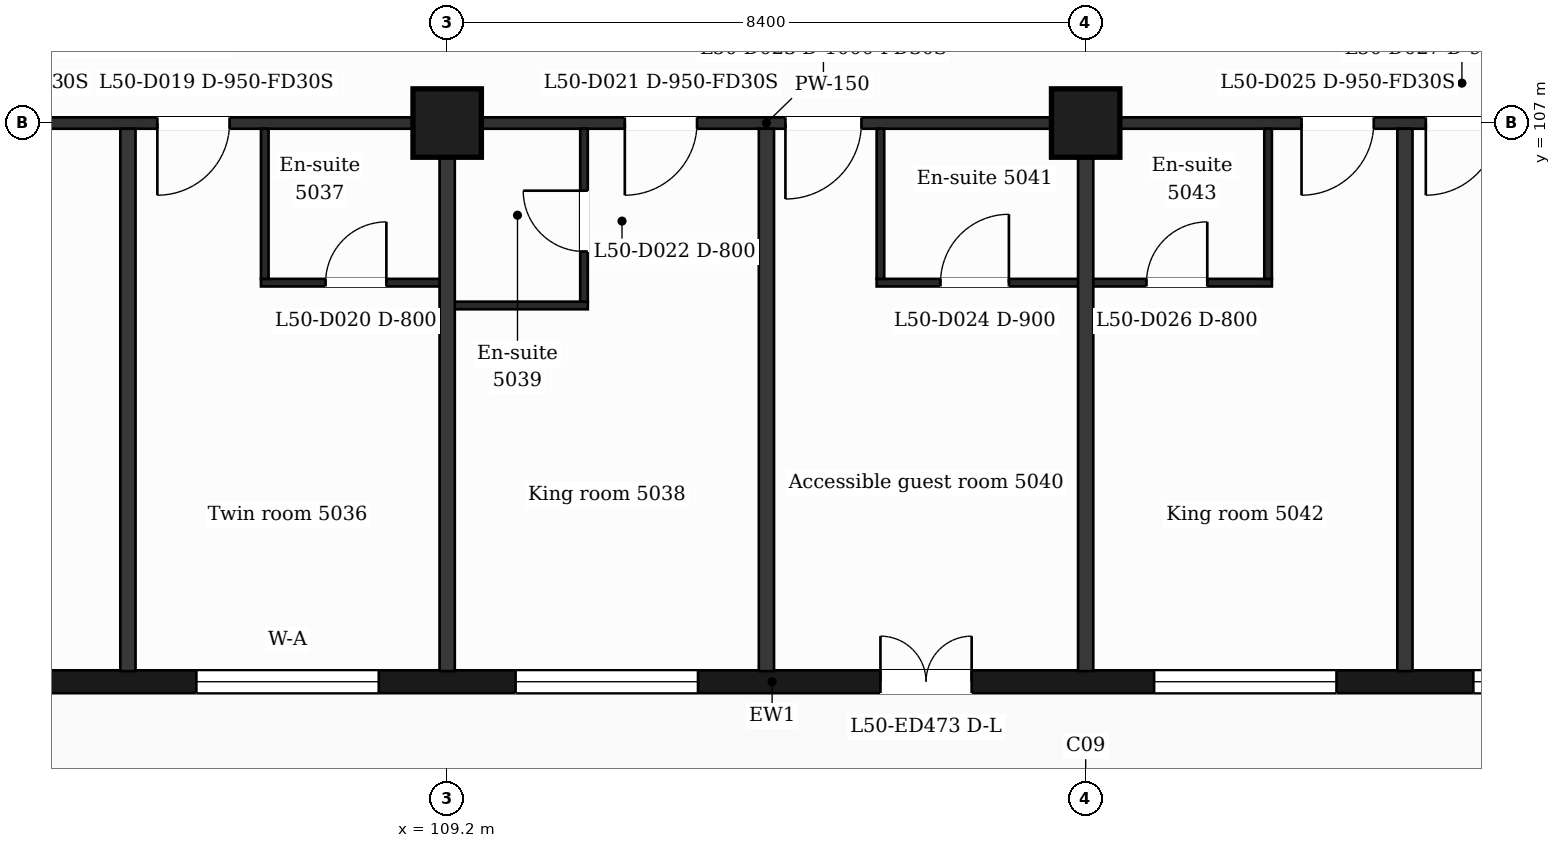
"""IFC4 building model, lengths in metres.
Left out: names, types, materials, properties, quantities, classifications, styles, units other than length and angle.
Written with IfcOpenShell. Run it as: python <this file> out.ifc"""

import sys

from ifc_helpers import new_model, si_unit, direction, frame, frame_2d, origin, origin_2d, place, context, subcontext, project, spatial, rectangle, extrude, element, fill, save


model = new_model("IFC4")
c1 = context("Model", 3, precision=1e-05, world=origin(), true_north=direction((0.0, 1.0)))
c2 = subcontext(c1, "Body", "Model", "MODEL_VIEW")
j1 = project(units=[si_unit("LENGTHUNIT", "METRE"), si_unit("PLANEANGLEUNIT", "RADIAN")], contexts=[c1])
p1 = place(None, origin())
s1 = spatial("IfcSite", under=j1, at=p1, CompositionType="ELEMENT")
p2 = place(p1, origin())
s2 = spatial("IfcBuilding", under=s1, at=p2, CompositionType="ELEMENT")
p3 = place(p2, frame((0.0, 0.0, 209.6)))
s3 = spatial("IfcBuildingStorey", under=s2, at=p3, CompositionType="ELEMENT", Elevation=209.6)
for number, where, z_axis, x_axis in (
    (1, (109.2, 107.0, 0.0), (0.0, 0.0, 1.0), (1.0, 0.0, 0.0)),
    (2, (117.6, 107.0, 0.0), (0.0, 0.0, 1.0), (1.0, 0.0, 0.0)),
):
    element("IfcColumn", number, at=place(p3, frame(where, z_axis=z_axis, x_axis=x_axis)), inside=s3, PredefinedType="COLUMN", context=c2, shape_type="SweptSolid", body=[
        extrude(rectangle(XDim=0.9, YDim=0.9, at=origin_2d()), origin(), (0.0, 0.0, 1.0), 3.7),
    ])
p4 = place(p3, frame((89.85, 99.65, 0.0), z_axis=(0.0, 0.0, 1.0), x_axis=(1.0, 0.0, 0.0)))
e3 = element("IfcWall", 3, at=p4, inside=s3, PredefinedType="SOLIDWALL", context=c2, shape_type="SweptSolid", body=[
    extrude(rectangle(XDim=47.25, YDim=0.3, at=frame_2d((23.625, 0.0))), origin(), (0.0, 0.0, 1.0), 3.38),
])
p5 = place(p4, frame((0.725, 0.0, 0.9)))
e4 = element("IfcOpeningElement", 4, at=p5, cuts=e3, PredefinedType="OPENING", context=c2, shape_type="SweptSolid", body=[
    extrude(rectangle(XDim=1.2, YDim=2.1, at=frame_2d((0.6, 1.05))), frame((0.0, 0.16, 0.0), z_axis=(0.0, -1.0, 0.0), x_axis=(1.0, 0.0, 0.0)), (0.0, 0.0, 1.0), 0.32),
])
p6 = place(p4, frame((3.45, 0.0, 0.9)))
e5 = element("IfcOpeningElement", 5, at=p6, cuts=e3, PredefinedType="OPENING", context=c2, shape_type="SweptSolid", body=[
    extrude(rectangle(XDim=2.4, YDim=2.1, at=frame_2d((1.2, 1.05))), frame((0.0, 0.16, 0.0), z_axis=(0.0, -1.0, 0.0), x_axis=(1.0, 0.0, 0.0)), (0.0, 0.0, 1.0), 0.32),
])
p7 = place(p4, frame((8.25, 0.0, 0.9)))
e6 = element("IfcOpeningElement", 6, at=p7, cuts=e3, PredefinedType="OPENING", context=c2, shape_type="SweptSolid", body=[
    extrude(rectangle(XDim=1.2, YDim=2.1, at=frame_2d((0.6, 1.05))), frame((0.0, 0.16, 0.0), z_axis=(0.0, -1.0, 0.0), x_axis=(1.0, 0.0, 0.0)), (0.0, 0.0, 1.0), 0.32),
])
p8 = place(p4, frame((12.45, 0.0, 0.9)))
e7 = element("IfcOpeningElement", 7, at=p8, cuts=e3, PredefinedType="OPENING", context=c2, shape_type="SweptSolid", body=[
    extrude(rectangle(XDim=1.2, YDim=2.1, at=frame_2d((0.6, 1.05))), frame((0.0, 0.16, 0.0), z_axis=(0.0, -1.0, 0.0), x_axis=(1.0, 0.0, 0.0)), (0.0, 0.0, 1.0), 0.32),
])
p9 = place(p4, frame((16.05, 0.0, 0.9)))
e8 = element("IfcOpeningElement", 8, at=p9, cuts=e3, PredefinedType="OPENING", context=c2, shape_type="SweptSolid", body=[
    extrude(rectangle(XDim=2.4, YDim=2.1, at=frame_2d((1.2, 1.05))), frame((0.0, 0.16, 0.0), z_axis=(0.0, -1.0, 0.0), x_axis=(1.0, 0.0, 0.0)), (0.0, 0.0, 1.0), 0.32),
])
p10 = place(p4, frame((20.25, 0.0, 0.9)))
e9 = element("IfcOpeningElement", 9, at=p10, cuts=e3, PredefinedType="OPENING", context=c2, shape_type="SweptSolid", body=[
    extrude(rectangle(XDim=2.4, YDim=2.1, at=frame_2d((1.2, 1.05))), frame((0.0, 0.16, 0.0), z_axis=(0.0, -1.0, 0.0), x_axis=(1.0, 0.0, 0.0)), (0.0, 0.0, 1.0), 0.32),
])
p11 = place(p4, frame((25.05, 0.0, 0.0)))
e10 = element("IfcOpeningElement", 10, at=p11, cuts=e3, PredefinedType="OPENING", context=c2, shape_type="SweptSolid", body=[
    extrude(rectangle(XDim=1.2, YDim=2.4, at=frame_2d((0.6, 1.2))), frame((0.0, 0.16, 0.0), z_axis=(0.0, -1.0, 0.0), x_axis=(1.0, 0.0, 0.0)), (0.0, 0.0, 1.0), 0.32),
])
p12 = place(p4, frame((28.65, 0.0, 0.9)))
e11 = element("IfcOpeningElement", 11, at=p12, cuts=e3, PredefinedType="OPENING", context=c2, shape_type="SweptSolid", body=[
    extrude(rectangle(XDim=2.4, YDim=2.1, at=frame_2d((1.2, 1.05))), frame((0.0, 0.16, 0.0), z_axis=(0.0, -1.0, 0.0), x_axis=(1.0, 0.0, 0.0)), (0.0, 0.0, 1.0), 0.32),
])
p13 = place(p4, frame((32.85, 0.0, 0.9)))
e12 = element("IfcOpeningElement", 12, at=p13, cuts=e3, PredefinedType="OPENING", context=c2, shape_type="SweptSolid", body=[
    extrude(rectangle(XDim=2.4, YDim=2.1, at=frame_2d((1.2, 1.05))), frame((0.0, 0.16, 0.0), z_axis=(0.0, -1.0, 0.0), x_axis=(1.0, 0.0, 0.0)), (0.0, 0.0, 1.0), 0.32),
])
p14 = place(p4, frame((37.65, 0.0, 0.9)))
e13 = element("IfcOpeningElement", 13, at=p14, cuts=e3, PredefinedType="OPENING", context=c2, shape_type="SweptSolid", body=[
    extrude(rectangle(XDim=1.2, YDim=2.1, at=frame_2d((0.6, 1.05))), frame((0.0, 0.16, 0.0), z_axis=(0.0, -1.0, 0.0), x_axis=(1.0, 0.0, 0.0)), (0.0, 0.0, 1.0), 0.32),
])
p15 = place(p4, frame((41.85, 0.0, 0.9)))
e14 = element("IfcOpeningElement", 14, at=p15, cuts=e3, PredefinedType="OPENING", context=c2, shape_type="SweptSolid", body=[
    extrude(rectangle(XDim=1.2, YDim=2.1, at=frame_2d((0.6, 1.05))), frame((0.0, 0.16, 0.0), z_axis=(0.0, -1.0, 0.0), x_axis=(1.0, 0.0, 0.0)), (0.0, 0.0, 1.0), 0.32),
])
p16 = place(p4, frame((45.25, 0.0, 0.9)))
e15 = element("IfcOpeningElement", 15, at=p16, cuts=e3, PredefinedType="OPENING", context=c2, shape_type="SweptSolid", body=[
    extrude(rectangle(XDim=1.2, YDim=2.1, at=frame_2d((0.6, 1.05))), frame((0.0, 0.16, 0.0), z_axis=(0.0, -1.0, 0.0), x_axis=(1.0, 0.0, 0.0)), (0.0, 0.0, 1.0), 0.32),
])
p17 = place(p3, frame((109.2, 104.6, 0.0), z_axis=(0.0, 0.0, 1.0), x_axis=(1.0, 0.0, 0.0)))
e16 = element("IfcWall", 16, at=p17, inside=s3, PredefinedType="PARTITIONING", context=c2, shape_type="SweptSolid", body=[
    extrude(rectangle(XDim=1.85, YDim=0.1, at=frame_2d((0.925, 0.0))), origin(), (0.0, 0.0, 1.0), 3.38),
])
p18 = place(p3, frame((106.75, 104.9, 0.0), z_axis=(0.0, 0.0, 1.0), x_axis=(1.0, 0.0, 0.0)))
e17 = element("IfcWall", 17, at=p18, inside=s3, PredefinedType="PARTITIONING", context=c2, shape_type="SweptSolid", body=[
    extrude(rectangle(XDim=2.45, YDim=0.1, at=frame_2d((1.225, 0.0))), origin(), (0.0, 0.0, 1.0), 3.38),
])
p19 = place(p18, frame((0.85, 0.0, 0.0)))
e18 = element("IfcOpeningElement", 18, at=p19, cuts=e17, PredefinedType="OPENING", context=c2, shape_type="SweptSolid", body=[
    extrude(rectangle(XDim=0.8, YDim=2.1, at=frame_2d((0.4, 1.05))), frame((0.0, 0.06, 0.0), z_axis=(0.0, -1.0, 0.0), x_axis=(1.0, 0.0, 0.0)), (0.0, 0.0, 1.0), 0.12),
])
p20 = place(p3, frame((114.85, 104.9, 0.0), z_axis=(0.0, 0.0, 1.0), x_axis=(1.0, 0.0, 0.0)))
e19 = element("IfcWall", 19, at=p20, inside=s3, PredefinedType="PARTITIONING", context=c2, shape_type="SweptSolid", body=[
    extrude(rectangle(XDim=5.2, YDim=0.1, at=frame_2d((2.6, 0.0))), origin(), (0.0, 0.0, 1.0), 3.38),
])
p21 = place(p20, frame((0.84, 0.0, 0.0)))
e20 = element("IfcOpeningElement", 20, at=p21, cuts=e19, PredefinedType="OPENING", context=c2, shape_type="SweptSolid", body=[
    extrude(rectangle(XDim=0.9, YDim=2.1, at=frame_2d((0.45, 1.05))), frame((0.0, 0.06, 0.0), z_axis=(0.0, -1.0, 0.0), x_axis=(1.0, 0.0, 0.0)), (0.0, 0.0, 1.0), 0.12),
])
p22 = place(p20, frame((3.55, 0.0, 0.0)))
e21 = element("IfcOpeningElement", 21, at=p22, cuts=e19, PredefinedType="OPENING", context=c2, shape_type="SweptSolid", body=[
    extrude(rectangle(XDim=0.8, YDim=2.1, at=frame_2d((0.4, 1.05))), frame((0.0, 0.06, 0.0), z_axis=(0.0, -1.0, 0.0), x_axis=(1.0, 0.0, 0.0)), (0.0, 0.0, 1.0), 0.12),
])
p23 = place(p3, frame((87.018, 107.0, 0.0), z_axis=(0.0, 0.0, 1.0), x_axis=(1.0, 0.0, 0.0)))
e22 = element("IfcWall", 22, at=p23, inside=s3, PredefinedType="PARTITIONING", context=c2, shape_type="SweptSolid", body=[
    extrude(rectangle(XDim=52.765, YDim=0.15, at=frame_2d((26.382, 0.0))), origin(), (0.0, 0.0, 1.0), 3.38),
])
p24 = place(p23, frame((1.276, 0.0, 0.0)))
e23 = element("IfcOpeningElement", 23, at=p24, cuts=e22, PredefinedType="OPENING", context=c2, shape_type="SweptSolid", body=[
    extrude(rectangle(XDim=0.95, YDim=2.1, at=frame_2d((0.475, 1.05))), frame((0.0, 0.085, 0.0), z_axis=(0.0, -1.0, 0.0), x_axis=(1.0, 0.0, 0.0)), (0.0, 0.0, 1.0), 0.17),
])
p25 = place(p23, frame((6.034, 0.0, 0.0)))
e24 = element("IfcOpeningElement", 24, at=p25, cuts=e22, PredefinedType="OPENING", context=c2, shape_type="SweptSolid", body=[
    extrude(rectangle(XDim=0.95, YDim=2.1, at=frame_2d((0.475, 1.05))), frame((0.0, 0.085, 0.0), z_axis=(0.0, -1.0, 0.0), x_axis=(1.0, 0.0, 0.0)), (0.0, 0.0, 1.0), 0.17),
])
p26 = place(p23, frame((15.445, 0.0, 0.0)))
e25 = element("IfcOpeningElement", 25, at=p26, cuts=e22, PredefinedType="OPENING", context=c2, shape_type="SweptSolid", body=[
    extrude(rectangle(XDim=0.95, YDim=2.1, at=frame_2d((0.475, 1.05))), frame((0.0, 0.085, 0.0), z_axis=(0.0, -1.0, 0.0), x_axis=(1.0, 0.0, 0.0)), (0.0, 0.0, 1.0), 0.17),
])
p27 = place(p23, frame((18.369, 0.0, 0.0)))
e26 = element("IfcOpeningElement", 26, at=p27, cuts=e22, PredefinedType="OPENING", context=c2, shape_type="SweptSolid", body=[
    extrude(rectangle(XDim=0.95, YDim=2.1, at=frame_2d((0.475, 1.05))), frame((0.0, 0.085, 0.0), z_axis=(0.0, -1.0, 0.0), x_axis=(1.0, 0.0, 0.0)), (0.0, 0.0, 1.0), 0.17),
])
p28 = place(p23, frame((24.519, 0.0, 0.0)))
e27 = element("IfcOpeningElement", 27, at=p28, cuts=e22, PredefinedType="OPENING", context=c2, shape_type="SweptSolid", body=[
    extrude(rectangle(XDim=0.95, YDim=2.1, at=frame_2d((0.475, 1.05))), frame((0.0, 0.085, 0.0), z_axis=(0.0, -1.0, 0.0), x_axis=(1.0, 0.0, 0.0)), (0.0, 0.0, 1.0), 0.17),
])
p29 = place(p23, frame((26.632, 0.0, 0.0)))
e28 = element("IfcOpeningElement", 28, at=p29, cuts=e22, PredefinedType="OPENING", context=c2, shape_type="SweptSolid", body=[
    extrude(rectangle(XDim=1.0, YDim=2.1, at=frame_2d((0.5, 1.05))), frame((0.0, 0.085, 0.0), z_axis=(0.0, -1.0, 0.0), x_axis=(1.0, 0.0, 0.0)), (0.0, 0.0, 1.0), 0.17),
])
p30 = place(p23, frame((33.422, 0.0, 0.0)))
e29 = element("IfcOpeningElement", 29, at=p30, cuts=e22, PredefinedType="OPENING", context=c2, shape_type="SweptSolid", body=[
    extrude(rectangle(XDim=0.95, YDim=2.1, at=frame_2d((0.475, 1.05))), frame((0.0, 0.085, 0.0), z_axis=(0.0, -1.0, 0.0), x_axis=(1.0, 0.0, 0.0)), (0.0, 0.0, 1.0), 0.17),
])
p31 = place(p23, frame((35.057, 0.0, 0.0)))
e30 = element("IfcOpeningElement", 30, at=p31, cuts=e22, PredefinedType="OPENING", context=c2, shape_type="SweptSolid", body=[
    extrude(rectangle(XDim=0.95, YDim=2.1, at=frame_2d((0.475, 1.05))), frame((0.0, 0.085, 0.0), z_axis=(0.0, -1.0, 0.0), x_axis=(1.0, 0.0, 0.0)), (0.0, 0.0, 1.0), 0.17),
])
p32 = place(p23, frame((44.532, 0.0, 0.0)))
e31 = element("IfcOpeningElement", 31, at=p32, cuts=e22, PredefinedType="OPENING", context=c2, shape_type="SweptSolid", body=[
    extrude(rectangle(XDim=1.0, YDim=2.1, at=frame_2d((0.5, 1.05))), frame((0.0, 0.085, 0.0), z_axis=(0.0, -1.0, 0.0), x_axis=(1.0, 0.0, 0.0)), (0.0, 0.0, 1.0), 0.17),
])
p33 = place(p23, frame((48.249, 0.0, 0.0)))
e32 = element("IfcOpeningElement", 32, at=p33, cuts=e22, PredefinedType="OPENING", context=c2, shape_type="SweptSolid", body=[
    extrude(rectangle(XDim=0.95, YDim=2.1, at=frame_2d((0.475, 1.05))), frame((0.0, 0.085, 0.0), z_axis=(0.0, -1.0, 0.0), x_axis=(1.0, 0.0, 0.0)), (0.0, 0.0, 1.0), 0.17),
])
p34 = place(p3, frame((105.0, 99.79, 0.0), z_axis=(0.0, 0.0, 1.0), x_axis=(0.0, 1.0, 0.0)))
e33 = element("IfcWall", 33, at=p34, inside=s3, PredefinedType="PARTITIONING", context=c2, shape_type="SweptSolid", body=[
    extrude(rectangle(XDim=7.135, YDim=0.2, at=frame_2d((3.567, 0.0))), origin(), (0.0, 0.0, 1.0), 3.38),
])
p35 = place(p3, frame((106.8, 104.95, 0.0), z_axis=(0.0, 0.0, 1.0), x_axis=(0.0, 1.0, 0.0)))
e34 = element("IfcWall", 34, at=p35, inside=s3, PredefinedType="PARTITIONING", context=c2, shape_type="SweptSolid", body=[
    extrude(rectangle(XDim=1.975, YDim=0.1, at=frame_2d((0.988, 0.0))), origin(), (0.0, 0.0, 1.0), 3.38),
])
p36 = place(p3, frame((109.2, 99.79, 0.0), z_axis=(0.0, 0.0, 1.0), x_axis=(0.0, 1.0, 0.0)))
e35 = element("IfcWall", 35, at=p36, inside=s3, PredefinedType="PARTITIONING", context=c2, shape_type="SweptSolid", body=[
    extrude(rectangle(XDim=7.135, YDim=0.2, at=frame_2d((3.567, 0.0))), origin(), (0.0, 0.0, 1.0), 3.38),
])
p37 = place(p3, frame((111.0, 104.65, 0.0), z_axis=(0.0, 0.0, 1.0), x_axis=(0.0, 1.0, 0.0)))
e36 = element("IfcWall", 36, at=p37, inside=s3, PredefinedType="PARTITIONING", context=c2, shape_type="SweptSolid", body=[
    extrude(rectangle(XDim=2.275, YDim=0.1, at=frame_2d((1.138, 0.0))), origin(), (0.0, 0.0, 1.0), 3.38),
])
p38 = place(p37, frame((0.66, 0.0, 0.0)))
e37 = element("IfcOpeningElement", 37, at=p38, cuts=e36, PredefinedType="OPENING", context=c2, shape_type="SweptSolid", body=[
    extrude(rectangle(XDim=0.8, YDim=2.1, at=frame_2d((0.4, 1.05))), frame((0.0, 0.06, 0.0), z_axis=(0.0, -1.0, 0.0), x_axis=(1.0, 0.0, 0.0)), (0.0, 0.0, 1.0), 0.12),
])
p39 = place(p3, frame((113.4, 99.79, 0.0), z_axis=(0.0, 0.0, 1.0), x_axis=(0.0, 1.0, 0.0)))
e38 = element("IfcWall", 38, at=p39, inside=s3, PredefinedType="PARTITIONING", context=c2, shape_type="SweptSolid", body=[
    extrude(rectangle(XDim=7.135, YDim=0.2, at=frame_2d((3.567, 0.0))), origin(), (0.0, 0.0, 1.0), 3.38),
])
p40 = place(p3, frame((114.9, 104.95, 0.0), z_axis=(0.0, 0.0, 1.0), x_axis=(0.0, 1.0, 0.0)))
e39 = element("IfcWall", 39, at=p40, inside=s3, PredefinedType="PARTITIONING", context=c2, shape_type="SweptSolid", body=[
    extrude(rectangle(XDim=1.975, YDim=0.1, at=frame_2d((0.988, 0.0))), origin(), (0.0, 0.0, 1.0), 3.38),
])
p41 = place(p3, frame((117.6, 99.79, 0.0), z_axis=(0.0, 0.0, 1.0), x_axis=(0.0, 1.0, 0.0)))
e40 = element("IfcWall", 40, at=p41, inside=s3, PredefinedType="PARTITIONING", context=c2, shape_type="SweptSolid", body=[
    extrude(rectangle(XDim=7.135, YDim=0.2, at=frame_2d((3.567, 0.0))), origin(), (0.0, 0.0, 1.0), 3.38),
])
p42 = place(p3, frame((120.0, 104.95, 0.0), z_axis=(0.0, 0.0, 1.0), x_axis=(0.0, 1.0, 0.0)))
e41 = element("IfcWall", 41, at=p42, inside=s3, PredefinedType="PARTITIONING", context=c2, shape_type="SweptSolid", body=[
    extrude(rectangle(XDim=1.975, YDim=0.1, at=frame_2d((0.988, 0.0))), origin(), (0.0, 0.0, 1.0), 3.38),
])
p43 = place(p3, frame((121.8, 99.79, 0.0), z_axis=(0.0, 0.0, 1.0), x_axis=(0.0, 1.0, 0.0)))
e42 = element("IfcWall", 42, at=p43, inside=s3, PredefinedType="PARTITIONING", context=c2, shape_type="SweptSolid", body=[
    extrude(rectangle(XDim=7.135, YDim=0.2, at=frame_2d((3.567, 0.0))), origin(), (0.0, 0.0, 1.0), 3.38),
])
p44 = place(p9, origin())
e43 = element("IfcWindow", 43, at=p44, inside=s3, PartitioningType="SINGLE_PANEL", PredefinedType="WINDOW", context=c2, shape_type="SweptSolid", body=[
    extrude(rectangle(XDim=2.4, YDim=2.1, at=frame_2d((1.2, 1.05))), frame((0.0, 0.03, 0.0), z_axis=(0.0, -1.0, 0.0), x_axis=(1.0, 0.0, 0.0)), (0.0, 0.0, 1.0), 0.06),
])
fill(e8, e43)
p45 = place(p10, origin())
e44 = element("IfcWindow", 44, at=p45, inside=s3, PartitioningType="SINGLE_PANEL", PredefinedType="WINDOW", context=c2, shape_type="SweptSolid", body=[
    extrude(rectangle(XDim=2.4, YDim=2.1, at=frame_2d((1.2, 1.05))), frame((0.0, 0.03, 0.0), z_axis=(0.0, -1.0, 0.0), x_axis=(1.0, 0.0, 0.0)), (0.0, 0.0, 1.0), 0.06),
])
fill(e9, e44)
p46 = place(p11, origin())
e45 = element("IfcDoor", 45, at=p46, inside=s3, OperationType="DOUBLE_DOOR_SINGLE_SWING", PredefinedType="DOOR", context=c2, shape_type="SweptSolid", body=[
    extrude(rectangle(XDim=1.2, YDim=2.4, at=frame_2d((0.6, 1.2))), frame((0.0, 0.025, 0.0), z_axis=(0.0, -1.0, 0.0), x_axis=(1.0, 0.0, 0.0)), (0.0, 0.0, 1.0), 0.05),
])
fill(e10, e45)
p47 = place(p12, origin())
e46 = element("IfcWindow", 46, at=p47, inside=s3, PartitioningType="SINGLE_PANEL", PredefinedType="WINDOW", context=c2, shape_type="SweptSolid", body=[
    extrude(rectangle(XDim=2.4, YDim=2.1, at=frame_2d((1.2, 1.05))), frame((0.0, 0.03, 0.0), z_axis=(0.0, -1.0, 0.0), x_axis=(1.0, 0.0, 0.0)), (0.0, 0.0, 1.0), 0.06),
])
fill(e11, e46)
p48 = place(p13, origin())
e47 = element("IfcWindow", 47, at=p48, inside=s3, PartitioningType="SINGLE_PANEL", PredefinedType="WINDOW", context=c2, shape_type="SweptSolid", body=[
    extrude(rectangle(XDim=2.4, YDim=2.1, at=frame_2d((1.2, 1.05))), frame((0.0, 0.03, 0.0), z_axis=(0.0, -1.0, 0.0), x_axis=(1.0, 0.0, 0.0)), (0.0, 0.0, 1.0), 0.06),
])
fill(e12, e47)
p49 = place(p27, origin())
e48 = element("IfcDoor", 48, at=p49, inside=s3, OperationType="SINGLE_SWING_LEFT", PredefinedType="DOOR", context=c2, shape_type="SweptSolid", body=[
    extrude(rectangle(XDim=0.95, YDim=2.1, at=frame_2d((0.475, 1.05))), frame((0.0, 0.025, 0.0), z_axis=(0.0, -1.0, 0.0), x_axis=(1.0, 0.0, 0.0)), (0.0, 0.0, 1.0), 0.05),
])
fill(e26, e48)
p50 = place(p19, origin())
e49 = element("IfcDoor", 49, at=p50, inside=s3, OperationType="SINGLE_SWING_RIGHT", PredefinedType="DOOR", context=c2, shape_type="SweptSolid", body=[
    extrude(rectangle(XDim=0.8, YDim=2.1, at=frame_2d((0.4, 1.05))), frame((0.0, 0.025, 0.0), z_axis=(0.0, -1.0, 0.0), x_axis=(1.0, 0.0, 0.0)), (0.0, 0.0, 1.0), 0.05),
])
fill(e18, e49)
p51 = place(p28, origin())
e50 = element("IfcDoor", 50, at=p51, inside=s3, OperationType="SINGLE_SWING_LEFT", PredefinedType="DOOR", context=c2, shape_type="SweptSolid", body=[
    extrude(rectangle(XDim=0.95, YDim=2.1, at=frame_2d((0.475, 1.05))), frame((0.0, 0.025, 0.0), z_axis=(0.0, -1.0, 0.0), x_axis=(1.0, 0.0, 0.0)), (0.0, 0.0, 1.0), 0.05),
])
fill(e27, e50)
p52 = place(p38, origin())
e51 = element("IfcDoor", 51, at=p52, inside=s3, OperationType="SINGLE_SWING_RIGHT", PredefinedType="DOOR", context=c2, shape_type="SweptSolid", body=[
    extrude(rectangle(XDim=0.8, YDim=2.1, at=frame_2d((0.4, 1.05))), frame((0.0, 0.025, 0.0), z_axis=(0.0, -1.0, 0.0), x_axis=(1.0, 0.0, 0.0)), (0.0, 0.0, 1.0), 0.05),
])
fill(e37, e51)
p53 = place(p29, origin())
e52 = element("IfcDoor", 52, at=p53, inside=s3, OperationType="SINGLE_SWING_LEFT", PredefinedType="DOOR", context=c2, shape_type="SweptSolid", body=[
    extrude(rectangle(XDim=1.0, YDim=2.1, at=frame_2d((0.5, 1.05))), frame((0.0, 0.025, 0.0), z_axis=(0.0, -1.0, 0.0), x_axis=(1.0, 0.0, 0.0)), (0.0, 0.0, 1.0), 0.05),
])
fill(e28, e52)
p54 = place(p21, origin())
e53 = element("IfcDoor", 53, at=p54, inside=s3, OperationType="SINGLE_SWING_RIGHT", PredefinedType="DOOR", context=c2, shape_type="SweptSolid", body=[
    extrude(rectangle(XDim=0.9, YDim=2.1, at=frame_2d((0.45, 1.05))), frame((0.0, 0.025, 0.0), z_axis=(0.0, -1.0, 0.0), x_axis=(1.0, 0.0, 0.0)), (0.0, 0.0, 1.0), 0.05),
])
fill(e20, e53)
p55 = place(p30, origin())
e54 = element("IfcDoor", 54, at=p55, inside=s3, OperationType="SINGLE_SWING_LEFT", PredefinedType="DOOR", context=c2, shape_type="SweptSolid", body=[
    extrude(rectangle(XDim=0.95, YDim=2.1, at=frame_2d((0.475, 1.05))), frame((0.0, 0.025, 0.0), z_axis=(0.0, -1.0, 0.0), x_axis=(1.0, 0.0, 0.0)), (0.0, 0.0, 1.0), 0.05),
])
fill(e29, e54)
p56 = place(p22, origin())
e55 = element("IfcDoor", 55, at=p56, inside=s3, OperationType="SINGLE_SWING_RIGHT", PredefinedType="DOOR", context=c2, shape_type="SweptSolid", body=[
    extrude(rectangle(XDim=0.8, YDim=2.1, at=frame_2d((0.4, 1.05))), frame((0.0, 0.025, 0.0), z_axis=(0.0, -1.0, 0.0), x_axis=(1.0, 0.0, 0.0)), (0.0, 0.0, 1.0), 0.05),
])
fill(e21, e55)
p57 = place(p31, origin())
e56 = element("IfcDoor", 56, at=p57, inside=s3, OperationType="SINGLE_SWING_LEFT", PredefinedType="DOOR", context=c2, shape_type="SweptSolid", body=[
    extrude(rectangle(XDim=0.95, YDim=2.1, at=frame_2d((0.475, 1.05))), frame((0.0, 0.025, 0.0), z_axis=(0.0, -1.0, 0.0), x_axis=(1.0, 0.0, 0.0)), (0.0, 0.0, 1.0), 0.05),
])
fill(e30, e56)
save(model, sys.argv[1])
